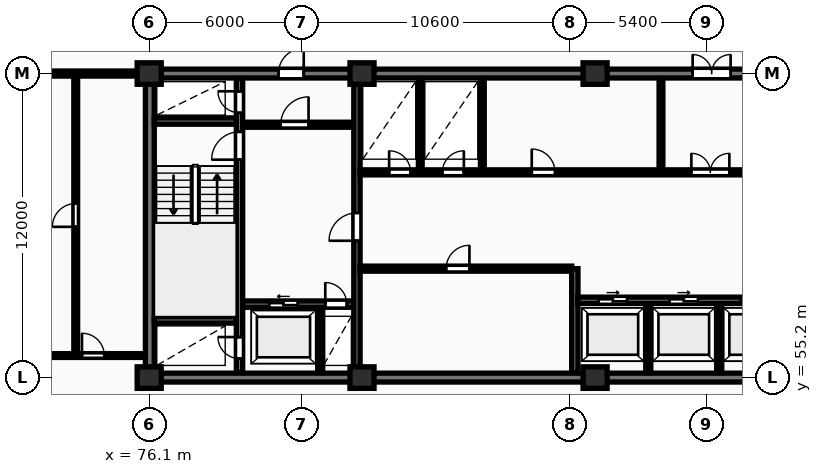
"""IFC4 building model, lengths in metres.
Left out: names, types, materials, properties, quantities, classifications, styles, units other than length and angle.
Written with IfcOpenShell. Run it as: python <this file> out.ifc"""

import sys

from ifc_helpers import new_model, si_unit, direction, frame, frame_2d, origin, origin_2d, place, context, subcontext, project, spatial, rectangle, extrude, element, fill, save


model = new_model("IFC4")
c1 = context("Model", 3, precision=1e-05, world=origin(), true_north=direction((0.0, 1.0)))
c2 = subcontext(c1, "Body", "Model", "MODEL_VIEW")
j1 = project(units=[si_unit("LENGTHUNIT", "METRE"), si_unit("PLANEANGLEUNIT", "RADIAN")], contexts=[c1])
p1 = place(None, origin())
s1 = spatial("IfcSite", under=j1, at=p1, CompositionType="ELEMENT")
p2 = place(p1, origin())
s2 = spatial("IfcBuilding", under=s1, at=p2, CompositionType="ELEMENT")
p3 = place(p2, frame((0.0, 0.0, 126.3)))
s3 = spatial("IfcBuildingStorey", under=s2, at=p3, CompositionType="ELEMENT", Elevation=126.3)
for number, where, z_axis, x_axis in (
    (1, (76.1, 55.2, 0.0), (0.0, 0.0, 1.0), (1.0, 0.0, 0.0)),
    (2, (76.1, 67.2, 0.0), (0.0, 0.0, 1.0), (1.0, 0.0, 0.0)),
    (3, (84.5, 55.2, 0.0), (0.0, 0.0, 1.0), (1.0, 0.0, 0.0)),
    (4, (84.5, 67.2, 0.0), (0.0, 0.0, 1.0), (1.0, 0.0, 0.0)),
    (5, (93.7, 55.2, 0.0), (0.0, 0.0, 1.0), (1.0, 0.0, 0.0)),
    (6, (93.7, 67.2, 0.0), (0.0, 0.0, 1.0), (1.0, 0.0, 0.0)),
):
    element("IfcColumn", number, at=place(p3, frame(where, z_axis=z_axis, x_axis=x_axis)), inside=s3, PredefinedType="COLUMN", context=c2, shape_type="SweptSolid", body=[
        extrude(rectangle(XDim=0.95, YDim=0.85, at=origin_2d()), origin(), (0.0, 0.0, 1.0), 3.25),
    ])
p4 = place(p3, frame((75.95, 55.2, 0.0), z_axis=(0.0, 0.0, 1.0), x_axis=(1.0, 0.0, 0.0)))
e7 = element("IfcWall", 7, at=p4, inside=s3, PredefinedType="SHEAR", context=c2, shape_type="SweptSolid", body=[
    extrude(rectangle(XDim=36.3, YDim=0.35, at=frame_2d((18.15, 0.0))), origin(), (0.0, 0.0, 1.0), 3.25),
])
p5 = place(p3, frame((76.125, 55.375, 0.0), z_axis=(0.0, 0.0, 1.0), x_axis=(0.0, 1.0, 0.0)))
e8 = element("IfcWall", 8, at=p5, inside=s3, PredefinedType="SHEAR", context=c2, shape_type="SweptSolid", body=[
    extrude(rectangle(XDim=11.65, YDim=0.35, at=frame_2d((5.825, 0.0))), origin(), (0.0, 0.0, 1.0), 3.25),
])
p6 = place(p3, frame((75.95, 67.2, 0.0), z_axis=(0.0, 0.0, 1.0), x_axis=(1.0, 0.0, 0.0)))
e9 = element("IfcWall", 9, at=p6, inside=s3, PredefinedType="SHEAR", context=c2, shape_type="SweptSolid", body=[
    extrude(rectangle(XDim=36.3, YDim=0.35, at=frame_2d((18.15, 0.0))), origin(), (0.0, 0.0, 1.0), 3.25),
])
p7 = place(p6, frame((5.25, 0.0, 0.0)))
e10 = element("IfcOpeningElement", 10, at=p7, cuts=e9, PredefinedType="OPENING", context=c2, shape_type="SweptSolid", body=[
    extrude(rectangle(XDim=1.0, YDim=2.15, at=frame_2d((0.5, 1.075))), frame((0.0, 0.185, 0.0), z_axis=(0.0, -1.0, 0.0), x_axis=(1.0, 0.0, 0.0)), (0.0, 0.0, 1.0), 0.37),
])
p8 = place(p6, frame((21.6, 0.0, 0.0)))
e11 = element("IfcOpeningElement", 11, at=p8, cuts=e9, PredefinedType="OPENING", context=c2, shape_type="SweptSolid", body=[
    extrude(rectangle(XDim=1.5, YDim=2.2, at=frame_2d((0.75, 1.1))), frame((0.0, 0.185, 0.0), z_axis=(0.0, -1.0, 0.0), x_axis=(1.0, 0.0, 0.0)), (0.0, 0.0, 1.0), 0.37),
])
p9 = place(p6, frame((30.45, 0.0, 0.0)))
e12 = element("IfcOpeningElement", 12, at=p9, cuts=e9, PredefinedType="OPENING", context=c2, shape_type="SweptSolid", body=[
    extrude(rectangle(XDim=1.0, YDim=2.15, at=frame_2d((0.5, 1.075))), frame((0.0, 0.185, 0.0), z_axis=(0.0, -1.0, 0.0), x_axis=(1.0, 0.0, 0.0)), (0.0, 0.0, 1.0), 0.37),
])
p10 = place(p3, frame((79.665, 55.4, 0.0), z_axis=(0.0, 0.0, 1.0), x_axis=(0.0, 1.0, 0.0)))
e13 = element("IfcWall", 13, at=p10, inside=s3, PredefinedType="SHEAR", context=c2, shape_type="SweptSolid", body=[
    extrude(rectangle(XDim=11.6, YDim=0.25, at=frame_2d((5.8, 0.0))), origin(), (0.0, 0.0, 1.0), 3.25),
])
p11 = place(p10, frame((0.55, 0.0, 0.0)))
e14 = element("IfcOpeningElement", 14, at=p11, cuts=e13, PredefinedType="OPENING", context=c2, shape_type="SweptSolid", body=[
    extrude(rectangle(XDim=0.85, YDim=2.05, at=frame_2d((0.425, 1.025))), frame((0.0, 0.135, 0.0), z_axis=(0.0, -1.0, 0.0), x_axis=(1.0, 0.0, 0.0)), (0.0, 0.0, 1.0), 0.27),
])
p12 = place(p10, frame((8.4, 0.0, 0.0)))
e15 = element("IfcOpeningElement", 15, at=p12, cuts=e13, PredefinedType="OPENING", context=c2, shape_type="SweptSolid", body=[
    extrude(rectangle(XDim=1.1, YDim=2.1, at=frame_2d((0.55, 1.05))), frame((0.0, 0.135, 0.0), z_axis=(0.0, -1.0, 0.0), x_axis=(1.0, 0.0, 0.0)), (0.0, 0.0, 1.0), 0.27),
])
p13 = place(p10, frame((10.25, 0.0, 0.0)))
e16 = element("IfcOpeningElement", 16, at=p13, cuts=e13, PredefinedType="OPENING", context=c2, shape_type="SweptSolid", body=[
    extrude(rectangle(XDim=0.85, YDim=2.05, at=frame_2d((0.425, 1.025))), frame((0.0, 0.135, 0.0), z_axis=(0.0, -1.0, 0.0), x_axis=(1.0, 0.0, 0.0)), (0.0, 0.0, 1.0), 0.27),
])
for number, where, z_axis, x_axis in (
    (17, (76.3, 57.475, 0.0), (0.0, 0.0, 1.0), (1.0, 0.0, 0.0)),
    (18, (76.3, 65.325, 0.0), (0.0, 0.0, 1.0), (1.0, 0.0, 0.0)),
):
    element("IfcWall", number, at=place(p3, frame(where, z_axis=z_axis, x_axis=x_axis)), inside=s3, PredefinedType="SHEAR", context=c2, shape_type="SweptSolid", body=[
        extrude(rectangle(XDim=3.24, YDim=0.25, at=frame_2d((1.62, 0.0))), origin(), (0.0, 0.0, 1.0), 3.25),
    ])
p14 = place(p3, frame((79.79, 58.1, 0.0), z_axis=(0.0, 0.0, 1.0), x_axis=(1.0, 0.0, 0.0)))
e19 = element("IfcWall", 19, at=p14, inside=s3, PredefinedType="SHEAR", context=c2, shape_type="SweptSolid", body=[
    extrude(rectangle(XDim=4.39, YDim=0.25, at=frame_2d((2.195, 0.0))), origin(), (0.0, 0.0, 1.0), 3.25),
])
p15 = place(p14, frame((1.05, 0.0, 0.0)))
e20 = element("IfcOpeningElement", 20, at=p15, cuts=e19, PredefinedType="OPENING", context=c2, shape_type="SweptSolid", body=[
    extrude(rectangle(XDim=1.12, YDim=2.12, at=frame_2d((0.56, 1.06))), frame((0.0, 0.135, 0.0), z_axis=(0.0, -1.0, 0.0), x_axis=(1.0, 0.0, 0.0)), (0.0, 0.0, 1.0), 0.27),
])
p16 = place(p14, frame((3.26, 0.0, 0.0)))
e21 = element("IfcOpeningElement", 21, at=p16, cuts=e19, PredefinedType="OPENING", context=c2, shape_type="SweptSolid", body=[
    extrude(rectangle(XDim=0.85, YDim=2.05, at=frame_2d((0.425, 1.025))), frame((0.0, 0.135, 0.0), z_axis=(0.0, -1.0, 0.0), x_axis=(1.0, 0.0, 0.0)), (0.0, 0.0, 1.0), 0.27),
])
p17 = place(p3, frame((82.85, 55.4, 0.0), z_axis=(0.0, 0.0, 1.0), x_axis=(0.0, 1.0, 0.0)))
e22 = element("IfcWall", 22, at=p17, inside=s3, PredefinedType="PARTITIONING", context=c2, shape_type="SweptSolid", body=[
    extrude(rectangle(XDim=2.56, YDim=0.2, at=frame_2d((1.28, 0.0))), origin(), (0.0, 0.0, 1.0), 2.97),
])
p18 = place(p3, frame((79.79, 65.18, 0.0), z_axis=(0.0, 0.0, 1.0), x_axis=(1.0, 0.0, 0.0)))
e23 = element("IfcWall", 23, at=p18, inside=s3, PredefinedType="PARTITIONING", context=c2, shape_type="SweptSolid", body=[
    extrude(rectangle(XDim=4.39, YDim=0.2, at=frame_2d((2.195, 0.0))), origin(), (0.0, 0.0, 1.0), 2.97),
])
p19 = place(p18, frame((1.5, 0.0, 0.0)))
e24 = element("IfcOpeningElement", 24, at=p19, cuts=e23, PredefinedType="OPENING", context=c2, shape_type="SweptSolid", body=[
    extrude(rectangle(XDim=1.1, YDim=2.1, at=frame_2d((0.55, 1.05))), frame((0.0, 0.11, 0.0), z_axis=(0.0, -1.0, 0.0), x_axis=(1.0, 0.0, 0.0)), (0.0, 0.0, 1.0), 0.22),
])
p20 = place(p3, frame((84.3, 55.4, 0.0), z_axis=(0.0, 0.0, 1.0), x_axis=(0.0, 1.0, 0.0)))
e25 = element("IfcWall", 25, at=p20, inside=s3, PredefinedType="SHEAR", context=c2, shape_type="SweptSolid", body=[
    extrude(rectangle(XDim=11.6, YDim=0.25, at=frame_2d((5.8, 0.0))), origin(), (0.0, 0.0, 1.0), 3.25),
])
p21 = place(p20, frame((5.2, 0.0, 0.0)))
e26 = element("IfcOpeningElement", 26, at=p21, cuts=e25, PredefinedType="OPENING", context=c2, shape_type="SweptSolid", body=[
    extrude(rectangle(XDim=1.1, YDim=2.1, at=frame_2d((0.55, 1.05))), frame((0.0, 0.135, 0.0), z_axis=(0.0, -1.0, 0.0), x_axis=(1.0, 0.0, 0.0)), (0.0, 0.0, 1.0), 0.27),
])
p22 = place(p3, frame((84.42, 59.5, 0.0), z_axis=(0.0, 0.0, 1.0), x_axis=(1.0, 0.0, 0.0)))
e27 = element("IfcWall", 27, at=p22, inside=s3, PredefinedType="PARTITIONING", context=c2, shape_type="SweptSolid", body=[
    extrude(rectangle(XDim=8.36, YDim=0.2, at=frame_2d((4.18, 0.0))), origin(), (0.0, 0.0, 1.0), 2.97),
])
p23 = place(p22, frame((3.4, 0.0, 0.0)))
e28 = element("IfcOpeningElement", 28, at=p23, cuts=e27, PredefinedType="OPENING", context=c2, shape_type="SweptSolid", body=[
    extrude(rectangle(XDim=0.92, YDim=2.08, at=frame_2d((0.46, 1.04))), frame((0.0, 0.11, 0.0), z_axis=(0.0, -1.0, 0.0), x_axis=(1.0, 0.0, 0.0)), (0.0, 0.0, 1.0), 0.22),
])
p24 = place(p3, frame((92.9, 55.4, 0.0), z_axis=(0.0, 0.0, 1.0), x_axis=(0.0, 1.0, 0.0)))
e29 = element("IfcWall", 29, at=p24, inside=s3, PredefinedType="SHEAR", context=c2, shape_type="SweptSolid", body=[
    extrude(rectangle(XDim=4.1, YDim=0.25, at=frame_2d((2.05, 0.0))), origin(), (0.0, 0.0, 1.0), 3.25),
])
for number, where, z_axis, x_axis in (
    (30, (95.8, 55.4, 0.0), (0.0, 0.0, 1.0), (0.0, 1.0, 0.0)),
    (31, (98.6, 55.4, 0.0), (0.0, 0.0, 1.0), (0.0, 1.0, 0.0)),
):
    element("IfcWall", number, at=place(p3, frame(where, z_axis=z_axis, x_axis=x_axis)), inside=s3, PredefinedType="PARTITIONING", context=c2, shape_type="SweptSolid", body=[
        extrude(rectangle(XDim=2.72, YDim=0.2, at=frame_2d((1.36, 0.0))), origin(), (0.0, 0.0, 1.0), 2.97),
    ])
p25 = place(p3, frame((93.02, 58.25, 0.0), z_axis=(0.0, 0.0, 1.0), x_axis=(1.0, 0.0, 0.0)))
e32 = element("IfcWall", 32, at=p25, inside=s3, PredefinedType="SHEAR", context=c2, shape_type="SweptSolid", body=[
    extrude(rectangle(XDim=8.36, YDim=0.25, at=frame_2d((4.18, 0.0))), origin(), (0.0, 0.0, 1.0), 3.25),
])
p26 = place(p25, frame((0.82, 0.0, 0.0)))
e33 = element("IfcOpeningElement", 33, at=p26, cuts=e32, PredefinedType="OPENING", context=c2, shape_type="SweptSolid", body=[
    extrude(rectangle(XDim=1.12, YDim=2.12, at=frame_2d((0.56, 1.06))), frame((0.0, 0.135, 0.0), z_axis=(0.0, -1.0, 0.0), x_axis=(1.0, 0.0, 0.0)), (0.0, 0.0, 1.0), 0.27),
])
p27 = place(p25, frame((3.62, 0.0, 0.0)))
e34 = element("IfcOpeningElement", 34, at=p27, cuts=e32, PredefinedType="OPENING", context=c2, shape_type="SweptSolid", body=[
    extrude(rectangle(XDim=1.12, YDim=2.12, at=frame_2d((0.56, 1.06))), frame((0.0, 0.135, 0.0), z_axis=(0.0, -1.0, 0.0), x_axis=(1.0, 0.0, 0.0)), (0.0, 0.0, 1.0), 0.27),
])
p28 = place(p25, frame((6.42, 0.0, 0.0)))
e35 = element("IfcOpeningElement", 35, at=p28, cuts=e32, PredefinedType="OPENING", context=c2, shape_type="SweptSolid", body=[
    extrude(rectangle(XDim=1.12, YDim=2.12, at=frame_2d((0.56, 1.06))), frame((0.0, 0.135, 0.0), z_axis=(0.0, -1.0, 0.0), x_axis=(1.0, 0.0, 0.0)), (0.0, 0.0, 1.0), 0.27),
])
for number, where, z_axis, x_axis in (
    (36, (86.8, 63.4, 0.0), (0.0, 0.0, 1.0), (0.0, 1.0, 0.0)),
    (37, (89.25, 63.4, 0.0), (0.0, 0.0, 1.0), (0.0, 1.0, 0.0)),
    (38, (96.3, 63.4, 0.0), (0.0, 0.0, 1.0), (0.0, 1.0, 0.0)),
):
    element("IfcWall", number, at=place(p3, frame(where, z_axis=z_axis, x_axis=x_axis)), inside=s3, PredefinedType="PARTITIONING", context=c2, shape_type="SweptSolid", body=[
        extrude(rectangle(XDim=3.6, YDim=0.15, at=frame_2d((1.8, 0.0))), origin(), (0.0, 0.0, 1.0), 2.97),
    ])
p29 = place(p3, frame((84.42, 63.3, 0.0), z_axis=(0.0, 0.0, 1.0), x_axis=(1.0, 0.0, 0.0)))
e39 = element("IfcWall", 39, at=p29, inside=s3, PredefinedType="PARTITIONING", context=c2, shape_type="SweptSolid", body=[
    extrude(rectangle(XDim=19.83, YDim=0.2, at=frame_2d((9.915, 0.0))), origin(), (0.0, 0.0, 1.0), 2.97),
])
p30 = place(p29, frame((1.15, 0.0, 0.0)))
e40 = element("IfcOpeningElement", 40, at=p30, cuts=e39, PredefinedType="OPENING", context=c2, shape_type="SweptSolid", body=[
    extrude(rectangle(XDim=0.85, YDim=2.05, at=frame_2d((0.425, 1.025))), frame((0.0, 0.11, 0.0), z_axis=(0.0, -1.0, 0.0), x_axis=(1.0, 0.0, 0.0)), (0.0, 0.0, 1.0), 0.22),
])
p31 = place(p29, frame((3.25, 0.0, 0.0)))
e41 = element("IfcOpeningElement", 41, at=p31, cuts=e39, PredefinedType="OPENING", context=c2, shape_type="SweptSolid", body=[
    extrude(rectangle(XDim=0.85, YDim=2.05, at=frame_2d((0.425, 1.025))), frame((0.0, 0.11, 0.0), z_axis=(0.0, -1.0, 0.0), x_axis=(1.0, 0.0, 0.0)), (0.0, 0.0, 1.0), 0.22),
])
p32 = place(p29, frame((13.08, 0.0, 0.0)))
e42 = element("IfcOpeningElement", 42, at=p32, cuts=e39, PredefinedType="OPENING", context=c2, shape_type="SweptSolid", body=[
    extrude(rectangle(XDim=1.5, YDim=2.2, at=frame_2d((0.75, 1.1))), frame((0.0, 0.11, 0.0), z_axis=(0.0, -1.0, 0.0), x_axis=(1.0, 0.0, 0.0)), (0.0, 0.0, 1.0), 0.22),
])
p33 = place(p29, frame((6.78, 0.0, 0.0)))
e43 = element("IfcOpeningElement", 43, at=p33, cuts=e39, PredefinedType="OPENING", context=c2, shape_type="SweptSolid", body=[
    extrude(rectangle(XDim=0.92, YDim=2.08, at=frame_2d((0.46, 1.04))), frame((0.0, 0.11, 0.0), z_axis=(0.0, -1.0, 0.0), x_axis=(1.0, 0.0, 0.0)), (0.0, 0.0, 1.0), 0.22),
])
p34 = place(p29, frame((16.28, 0.0, 0.0)))
e44 = element("IfcOpeningElement", 44, at=p34, cuts=e39, PredefinedType="OPENING", context=c2, shape_type="SweptSolid", body=[
    extrude(rectangle(XDim=0.92, YDim=2.08, at=frame_2d((0.46, 1.04))), frame((0.0, 0.11, 0.0), z_axis=(0.0, -1.0, 0.0), x_axis=(1.0, 0.0, 0.0)), (0.0, 0.0, 1.0), 0.22),
])
p35 = place(p3, frame((73.2, 56.07, 0.0), z_axis=(0.0, 0.0, 1.0), x_axis=(0.0, 1.0, 0.0)))
e45 = element("IfcWall", 45, at=p35, inside=s3, PredefinedType="PARTITIONING", context=c2, shape_type="SweptSolid", body=[
    extrude(rectangle(XDim=11.08, YDim=0.15, at=frame_2d((5.54, 0.0))), origin(), (0.0, 0.0, 1.0), 2.97),
])
p36 = place(p35, frame((5.08, 0.0, 0.0)))
e46 = element("IfcOpeningElement", 46, at=p36, cuts=e45, PredefinedType="OPENING", context=c2, shape_type="SweptSolid", body=[
    extrude(rectangle(XDim=0.92, YDim=2.08, at=frame_2d((0.46, 1.04))), frame((0.0, 0.085, 0.0), z_axis=(0.0, -1.0, 0.0), x_axis=(1.0, 0.0, 0.0)), (0.0, 0.0, 1.0), 0.17),
])
p37 = place(p3, frame((69.17, 56.07, 0.0), z_axis=(0.0, 0.0, 1.0), x_axis=(1.0, 0.0, 0.0)))
e47 = element("IfcWall", 47, at=p37, inside=s3, PredefinedType="PARTITIONING", context=c2, shape_type="SweptSolid", body=[
    extrude(rectangle(XDim=6.76, YDim=0.15, at=frame_2d((3.38, 0.0))), origin(), (0.0, 0.0, 1.0), 2.97),
])
p38 = place(p37, frame((1.362, 0.0, 0.0)))
e48 = element("IfcOpeningElement", 48, at=p38, cuts=e47, PredefinedType="OPENING", context=c2, shape_type="SweptSolid", body=[
    extrude(rectangle(XDim=0.84, YDim=2.04, at=frame_2d((0.42, 1.02))), frame((0.0, 0.085, 0.0), z_axis=(0.0, -1.0, 0.0), x_axis=(1.0, 0.0, 0.0)), (0.0, 0.0, 1.0), 0.17),
])
p39 = place(p37, frame((4.277, 0.0, 0.0)))
e49 = element("IfcOpeningElement", 49, at=p39, cuts=e47, PredefinedType="OPENING", context=c2, shape_type="SweptSolid", body=[
    extrude(rectangle(XDim=0.88, YDim=2.06, at=frame_2d((0.44, 1.03))), frame((0.0, 0.085, 0.0), z_axis=(0.0, -1.0, 0.0), x_axis=(1.0, 0.0, 0.0)), (0.0, 0.0, 1.0), 0.17),
])
p40 = place(p3, frame((57.6, 67.2, 0.0), z_axis=(0.0, 0.0, 1.0), x_axis=(1.0, 0.0, 0.0)))
e50 = element("IfcWall", 50, at=p40, inside=s3, PredefinedType="PARTITIONING", context=c2, shape_type="SweptSolid", body=[
    extrude(rectangle(XDim=18.35, YDim=0.2, at=frame_2d((9.175, 0.0))), origin(), (0.0, 0.0, 1.0), 2.433),
])
p41 = place(p40, frame((12.075, 0.0, 0.0)))
e51 = element("IfcOpeningElement", 51, at=p41, cuts=e50, PredefinedType="OPENING", context=c2, shape_type="SweptSolid", body=[
    extrude(rectangle(XDim=0.95, YDim=2.15, at=frame_2d((0.475, 1.075))), frame((0.0, 0.11, 0.0), z_axis=(0.0, -1.0, 0.0), x_axis=(1.0, 0.0, 0.0)), (0.0, 0.0, 1.0), 0.22),
])
p42 = place(p7, origin())
e52 = element("IfcDoor", 52, at=p42, inside=s3, OperationType="SINGLE_SWING_RIGHT", PredefinedType="DOOR", context=c2, shape_type="SweptSolid", body=[
    extrude(rectangle(XDim=1.0, YDim=2.15, at=frame_2d((0.5, 1.075))), frame((0.0, 0.025, 0.0), z_axis=(0.0, -1.0, 0.0), x_axis=(1.0, 0.0, 0.0)), (0.0, 0.0, 1.0), 0.05),
])
fill(e10, e52)
p43 = place(p8, origin())
e53 = element("IfcDoor", 53, at=p43, inside=s3, OperationType="DOUBLE_DOOR_SINGLE_SWING", PredefinedType="DOOR", context=c2, shape_type="SweptSolid", body=[
    extrude(rectangle(XDim=1.5, YDim=2.2, at=frame_2d((0.75, 1.1))), frame((0.0, 0.025, 0.0), z_axis=(0.0, -1.0, 0.0), x_axis=(1.0, 0.0, 0.0)), (0.0, 0.0, 1.0), 0.05),
])
fill(e11, e53)
p44 = place(p11, origin())
e54 = element("IfcDoor", 54, at=p44, inside=s3, OperationType="SINGLE_SWING_RIGHT", PredefinedType="DOOR", context=c2, shape_type="SweptSolid", body=[
    extrude(rectangle(XDim=0.85, YDim=2.05, at=frame_2d((0.425, 1.025))), frame((0.0, 0.025, 0.0), z_axis=(0.0, -1.0, 0.0), x_axis=(1.0, 0.0, 0.0)), (0.0, 0.0, 1.0), 0.05),
])
fill(e14, e54)
p45 = place(p12, origin())
e55 = element("IfcDoor", 55, at=p45, inside=s3, OperationType="SINGLE_SWING_LEFT", PredefinedType="DOOR", context=c2, shape_type="SweptSolid", body=[
    extrude(rectangle(XDim=1.1, YDim=2.1, at=frame_2d((0.55, 1.05))), frame((0.0, 0.025, 0.0), z_axis=(0.0, -1.0, 0.0), x_axis=(1.0, 0.0, 0.0)), (0.0, 0.0, 1.0), 0.05),
])
fill(e15, e55)
p46 = place(p13, origin())
e56 = element("IfcDoor", 56, at=p46, inside=s3, OperationType="SINGLE_SWING_RIGHT", PredefinedType="DOOR", context=c2, shape_type="SweptSolid", body=[
    extrude(rectangle(XDim=0.85, YDim=2.05, at=frame_2d((0.425, 1.025))), frame((0.0, 0.025, 0.0), z_axis=(0.0, -1.0, 0.0), x_axis=(1.0, 0.0, 0.0)), (0.0, 0.0, 1.0), 0.05),
])
fill(e16, e56)
p47 = place(p15, origin())
e57 = element("IfcDoor", 57, at=p47, inside=s3, OperationType="SLIDING_TO_LEFT", PredefinedType="DOOR", context=c2, shape_type="SweptSolid", body=[
    extrude(rectangle(XDim=1.12, YDim=2.12, at=frame_2d((0.56, 1.06))), frame((0.0, 0.025, 0.0), z_axis=(0.0, -1.0, 0.0), x_axis=(1.0, 0.0, 0.0)), (0.0, 0.0, 1.0), 0.05),
])
fill(e20, e57)
p48 = place(p16, origin())
e58 = element("IfcDoor", 58, at=p48, inside=s3, OperationType="SINGLE_SWING_LEFT", PredefinedType="DOOR", context=c2, shape_type="SweptSolid", body=[
    extrude(rectangle(XDim=0.85, YDim=2.05, at=frame_2d((0.425, 1.025))), frame((0.0, 0.025, 0.0), z_axis=(0.0, -1.0, 0.0), x_axis=(1.0, 0.0, 0.0)), (0.0, 0.0, 1.0), 0.05),
])
fill(e21, e58)
p49 = place(p19, origin())
e59 = element("IfcDoor", 59, at=p49, inside=s3, OperationType="SINGLE_SWING_RIGHT", PredefinedType="DOOR", context=c2, shape_type="SweptSolid", body=[
    extrude(rectangle(XDim=1.1, YDim=2.1, at=frame_2d((0.55, 1.05))), frame((0.0, 0.025, 0.0), z_axis=(0.0, -1.0, 0.0), x_axis=(1.0, 0.0, 0.0)), (0.0, 0.0, 1.0), 0.05),
])
fill(e24, e59)
p50 = place(p21, origin())
e60 = element("IfcDoor", 60, at=p50, inside=s3, OperationType="SINGLE_SWING_LEFT", PredefinedType="DOOR", context=c2, shape_type="SweptSolid", body=[
    extrude(rectangle(XDim=1.1, YDim=2.1, at=frame_2d((0.55, 1.05))), frame((0.0, 0.025, 0.0), z_axis=(0.0, -1.0, 0.0), x_axis=(1.0, 0.0, 0.0)), (0.0, 0.0, 1.0), 0.05),
])
fill(e26, e60)
p51 = place(p23, origin())
e61 = element("IfcDoor", 61, at=p51, inside=s3, OperationType="SINGLE_SWING_RIGHT", PredefinedType="DOOR", context=c2, shape_type="SweptSolid", body=[
    extrude(rectangle(XDim=0.92, YDim=2.08, at=frame_2d((0.46, 1.04))), frame((0.0, 0.025, 0.0), z_axis=(0.0, -1.0, 0.0), x_axis=(1.0, 0.0, 0.0)), (0.0, 0.0, 1.0), 0.05),
])
fill(e28, e61)
p52 = place(p26, origin())
e62 = element("IfcDoor", 62, at=p52, inside=s3, OperationType="SLIDING_TO_RIGHT", PredefinedType="DOOR", context=c2, shape_type="SweptSolid", body=[
    extrude(rectangle(XDim=1.12, YDim=2.12, at=frame_2d((0.56, 1.06))), frame((0.0, 0.025, 0.0), z_axis=(0.0, -1.0, 0.0), x_axis=(1.0, 0.0, 0.0)), (0.0, 0.0, 1.0), 0.05),
])
fill(e33, e62)
p53 = place(p27, origin())
e63 = element("IfcDoor", 63, at=p53, inside=s3, OperationType="SLIDING_TO_RIGHT", PredefinedType="DOOR", context=c2, shape_type="SweptSolid", body=[
    extrude(rectangle(XDim=1.12, YDim=2.12, at=frame_2d((0.56, 1.06))), frame((0.0, 0.025, 0.0), z_axis=(0.0, -1.0, 0.0), x_axis=(1.0, 0.0, 0.0)), (0.0, 0.0, 1.0), 0.05),
])
fill(e34, e63)
p54 = place(p28, origin())
e64 = element("IfcDoor", 64, at=p54, inside=s3, OperationType="SLIDING_TO_RIGHT", PredefinedType="DOOR", context=c2, shape_type="SweptSolid", body=[
    extrude(rectangle(XDim=1.12, YDim=2.12, at=frame_2d((0.56, 1.06))), frame((0.0, 0.025, 0.0), z_axis=(0.0, -1.0, 0.0), x_axis=(1.0, 0.0, 0.0)), (0.0, 0.0, 1.0), 0.05),
])
fill(e35, e64)
p55 = place(p30, origin())
e65 = element("IfcDoor", 65, at=p55, inside=s3, OperationType="SINGLE_SWING_LEFT", PredefinedType="DOOR", context=c2, shape_type="SweptSolid", body=[
    extrude(rectangle(XDim=0.85, YDim=2.05, at=frame_2d((0.425, 1.025))), frame((0.0, 0.025, 0.0), z_axis=(0.0, -1.0, 0.0), x_axis=(1.0, 0.0, 0.0)), (0.0, 0.0, 1.0), 0.05),
])
fill(e40, e65)
p56 = place(p31, origin())
e66 = element("IfcDoor", 66, at=p56, inside=s3, OperationType="SINGLE_SWING_RIGHT", PredefinedType="DOOR", context=c2, shape_type="SweptSolid", body=[
    extrude(rectangle(XDim=0.85, YDim=2.05, at=frame_2d((0.425, 1.025))), frame((0.0, 0.025, 0.0), z_axis=(0.0, -1.0, 0.0), x_axis=(1.0, 0.0, 0.0)), (0.0, 0.0, 1.0), 0.05),
])
fill(e41, e66)
p57 = place(p32, origin())
e67 = element("IfcDoor", 67, at=p57, inside=s3, OperationType="DOUBLE_DOOR_SINGLE_SWING", PredefinedType="DOOR", context=c2, shape_type="SweptSolid", body=[
    extrude(rectangle(XDim=1.5, YDim=2.2, at=frame_2d((0.75, 1.1))), frame((0.0, 0.025, 0.0), z_axis=(0.0, -1.0, 0.0), x_axis=(1.0, 0.0, 0.0)), (0.0, 0.0, 1.0), 0.05),
])
fill(e42, e67)
p58 = place(p33, origin())
e68 = element("IfcDoor", 68, at=p58, inside=s3, OperationType="SINGLE_SWING_LEFT", PredefinedType="DOOR", context=c2, shape_type="SweptSolid", body=[
    extrude(rectangle(XDim=0.92, YDim=2.08, at=frame_2d((0.46, 1.04))), frame((0.0, 0.025, 0.0), z_axis=(0.0, -1.0, 0.0), x_axis=(1.0, 0.0, 0.0)), (0.0, 0.0, 1.0), 0.05),
])
fill(e43, e68)
p59 = place(p36, origin())
e69 = element("IfcDoor", 69, at=p59, inside=s3, OperationType="SINGLE_SWING_LEFT", PredefinedType="DOOR", context=c2, shape_type="SweptSolid", body=[
    extrude(rectangle(XDim=0.92, YDim=2.08, at=frame_2d((0.46, 1.04))), frame((0.0, 0.025, 0.0), z_axis=(0.0, -1.0, 0.0), x_axis=(1.0, 0.0, 0.0)), (0.0, 0.0, 1.0), 0.05),
])
fill(e46, e69)
p60 = place(p39, origin())
e70 = element("IfcDoor", 70, at=p60, inside=s3, OperationType="SINGLE_SWING_LEFT", PredefinedType="DOOR", context=c2, shape_type="SweptSolid", body=[
    extrude(rectangle(XDim=0.88, YDim=2.06, at=frame_2d((0.44, 1.03))), frame((0.0, 0.025, 0.0), z_axis=(0.0, -1.0, 0.0), x_axis=(1.0, 0.0, 0.0)), (0.0, 0.0, 1.0), 0.05),
])
fill(e49, e70)
save(model, sys.argv[1])
